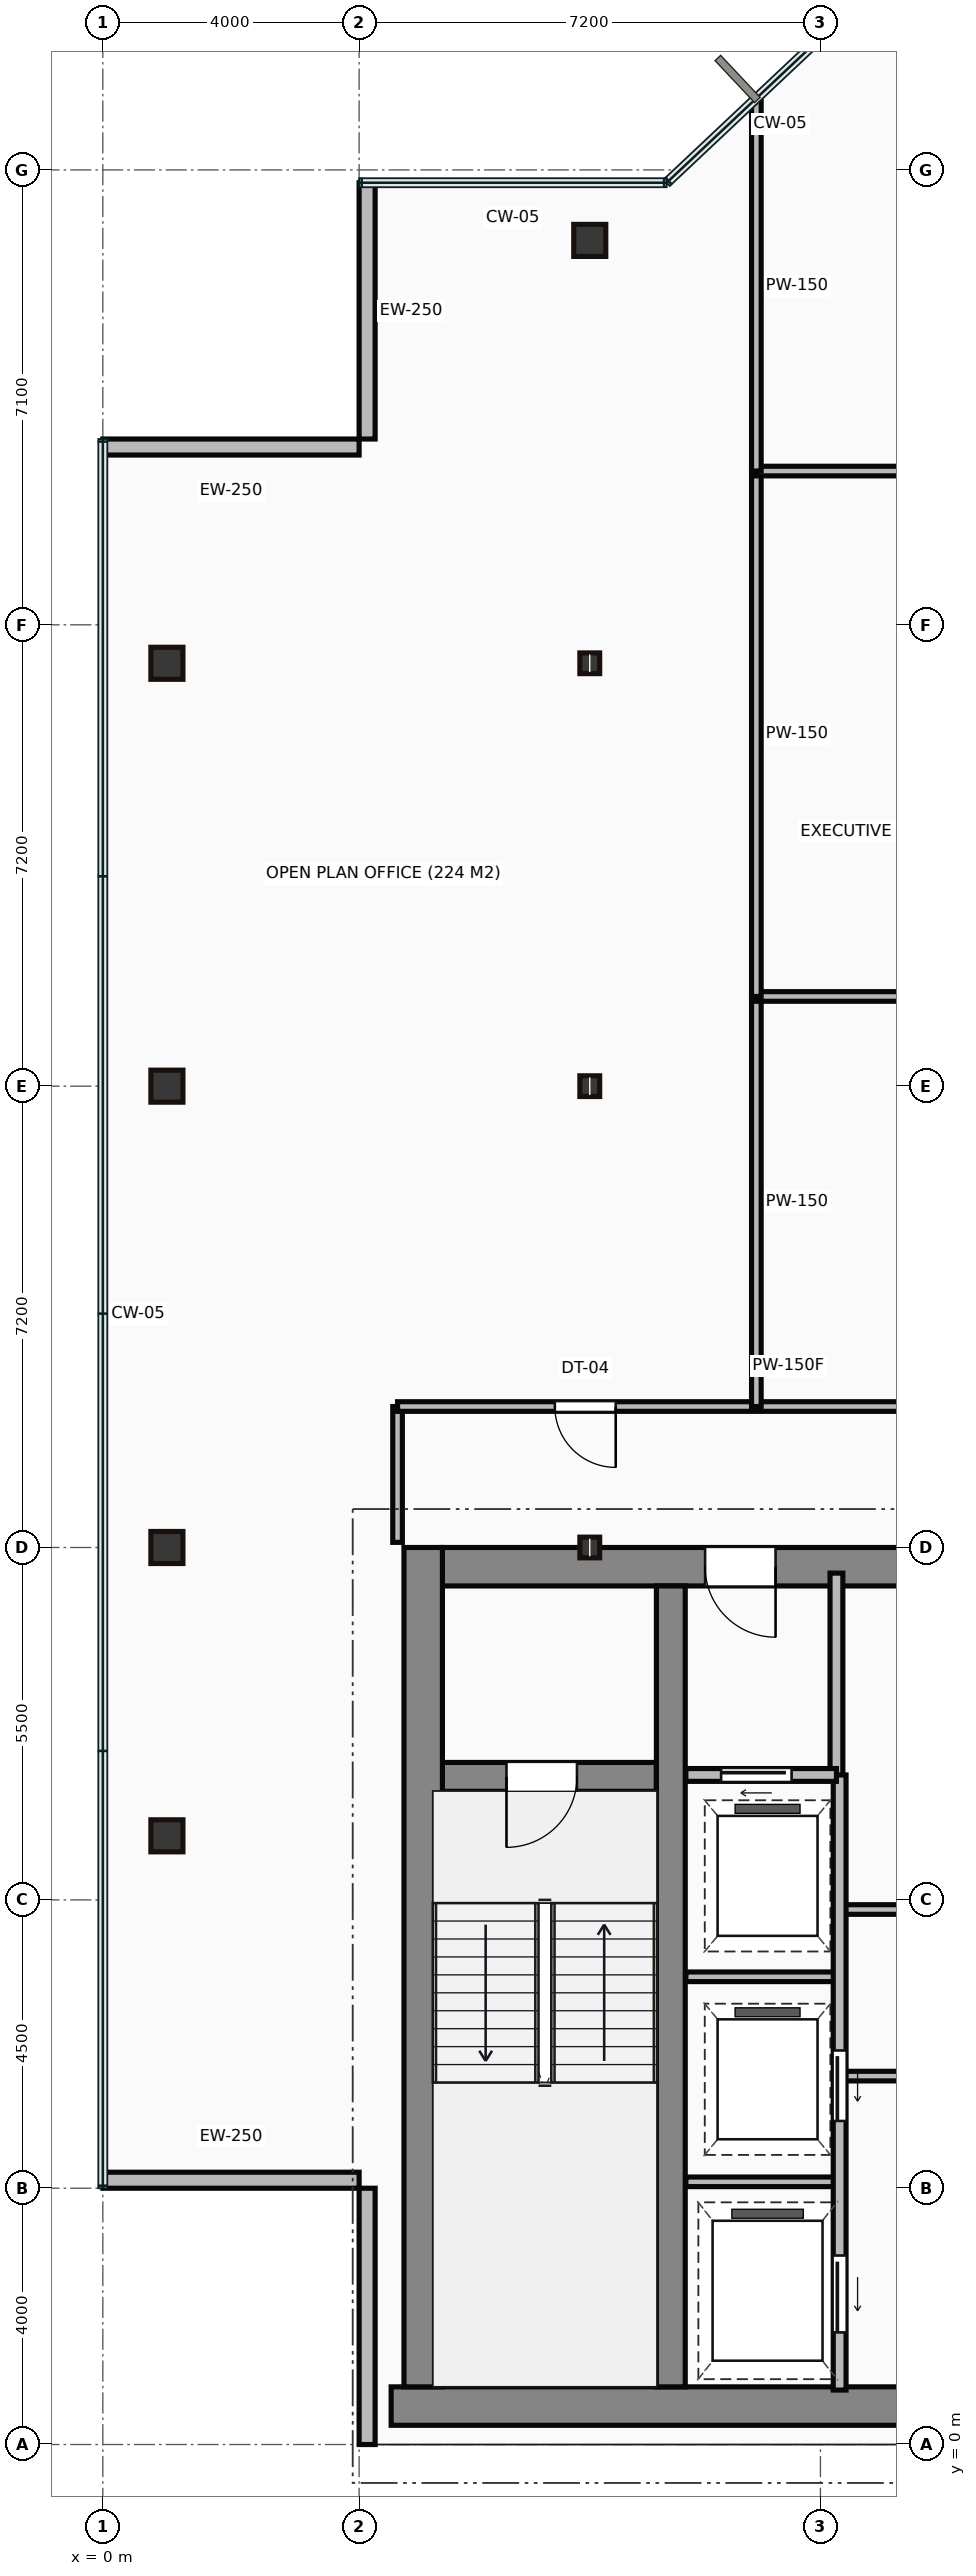
"""IFC4 building model, lengths in metres.
Left out: names, types, materials, properties, quantities, classifications, styles, units other than length and angle.
Written with IfcOpenShell. Run it as: python <this file> out.ifc"""

import sys

from ifc_helpers import new_model, si_unit, direction, frame, frame_2d, origin, origin_2d, place, context, subcontext, project, spatial, rectangle, hollow_rectangle, i_section, extrude, source, transform, mapped, element, fill, save


model = new_model("IFC4")
c1 = context("Model", 3, precision=1e-05, world=origin(), true_north=direction((0.0, 1.0)))
c2 = subcontext(c1, "Body", "Model", "MODEL_VIEW")
j1 = project(units=[si_unit("LENGTHUNIT", "METRE"), si_unit("PLANEANGLEUNIT", "RADIAN")], contexts=[c1])
p1 = place(None, origin())
s1 = spatial("IfcSite", under=j1, at=p1, CompositionType="ELEMENT")
p2 = place(p1, origin())
s2 = spatial("IfcBuilding", under=s1, at=p2, CompositionType="ELEMENT")
p3 = place(p2, frame((0.0, 0.0, 247.85)))
s3 = spatial("IfcBuildingStorey", under=s2, at=p3, CompositionType="ELEMENT", Elevation=247.85)
m1 = source(origin(), c2, "Body", "SweptSolid", [
    extrude(rectangle(XDim=29.5, YDim=0.6, at=frame_2d((14.75, 0.0))), origin(), (0.0, 0.0, 1.0), 3.65),
])
p4 = place(p3, frame((4.5, 0.6, 0.0), z_axis=(0.0, 0.0, 1.0), x_axis=(1.0, 0.0, 0.0)))
e1 = element("IfcWall", 1, at=p4, inside=s3, PredefinedType="SHEAR", context=c2, shape_type="MappedRepresentation", body=[
    mapped(m1, transform((0.0, 0.0, 0.0))),
])
m2 = source(origin(), c2, "Body", "SweptSolid", [
    extrude(rectangle(XDim=13.1, YDim=0.6, at=frame_2d((6.55, 0.0))), origin(), (0.0, 0.0, 1.0), 3.65),
])
p5 = place(p3, frame((5.0, 0.9, 0.0), z_axis=(0.0, 0.0, 1.0), x_axis=(0.0, 1.0, 0.0)))
e2 = element("IfcWall", 2, at=p5, inside=s3, PredefinedType="SHEAR", context=c2, shape_type="MappedRepresentation", body=[
    mapped(m2, transform((0.0, 0.0, 0.0))),
])
m3 = source(origin(), c2, "Body", "SweptSolid", [
    extrude(rectangle(XDim=9.1, YDim=0.6, at=frame_2d((4.55, 0.0))), origin(), (0.0, 0.0, 1.0), 3.65),
])
p6 = place(p3, frame((5.3, 13.7, 0.0), z_axis=(0.0, 0.0, 1.0), x_axis=(1.0, 0.0, 0.0)))
e3 = element("IfcWall", 3, at=p6, inside=s3, PredefinedType="SHEAR", context=c2, shape_type="MappedRepresentation", body=[
    mapped(m3, transform((0.0, 0.0, 0.0))),
])
p7 = place(p6, frame((4.1, 0.0, 0.0)))
e4 = element("IfcOpeningElement", 4, at=p7, cuts=e3, PredefinedType="OPENING", context=c2, shape_type="SweptSolid", body=[
    extrude(rectangle(XDim=1.1, YDim=2.15, at=frame_2d((0.55, 1.075))), frame((0.0, 0.31, 0.0), z_axis=(0.0, -1.0, 0.0), x_axis=(1.0, 0.0, 0.0)), (0.0, 0.0, 1.0), 0.62),
])
m4 = source(origin(), c2, "Body", "SweptSolid", [
    extrude(rectangle(XDim=12.5, YDim=0.45, at=frame_2d((6.25, 0.0))), origin(), (0.0, 0.0, 1.0), 3.65),
])
p8 = place(p3, frame((8.865, 0.9, 0.0), z_axis=(0.0, 0.0, 1.0), x_axis=(0.0, 1.0, 0.0)))
e5 = element("IfcWall", 5, at=p8, inside=s3, PredefinedType="SHEAR", context=c2, shape_type="MappedRepresentation", body=[
    mapped(m4, transform((0.0, 0.0, 0.0))),
])
m5 = source(origin(), c2, "Body", "SweptSolid", [
    extrude(rectangle(XDim=3.39, YDim=0.45, at=frame_2d((1.695, 0.0))), origin(), (0.0, 0.0, 1.0), 3.65),
])
p9 = place(p3, frame((5.25, 10.42, 0.0), z_axis=(0.0, 0.0, 1.0), x_axis=(1.0, 0.0, 0.0)))
e6 = element("IfcWall", 6, at=p9, inside=s3, PredefinedType="SHEAR", context=c2, shape_type="MappedRepresentation", body=[
    mapped(m5, transform((0.0, 0.0, 0.0))),
])
p10 = place(p9, frame((1.05, 0.0, 0.0)))
e7 = element("IfcOpeningElement", 7, at=p10, cuts=e6, PredefinedType="OPENING", context=c2, shape_type="SweptSolid", body=[
    extrude(rectangle(XDim=1.1, YDim=2.15, at=frame_2d((0.55, 1.075))), frame((0.0, 0.235, 0.0), z_axis=(0.0, -1.0, 0.0), x_axis=(1.0, 0.0, 0.0)), (0.0, 0.0, 1.0), 0.47),
])
m6 = source(origin(), c2, "Body", "SweptSolid", [
    extrude(hollow_rectangle(XDim=0.5, YDim=0.5, WallThickness=0.022, at=origin_2d()), origin(), (0.0, 0.0, 1.0), 3.65),
])
for number, where, z_axis, x_axis in (
    (8, (1.0, 9.5, 0.0), (0.0, 0.0, 1.0), (1.0, 0.0, 0.0)),
    (9, (1.0, 14.0, 0.0), (0.0, 0.0, 1.0), (1.0, 0.0, 0.0)),
    (10, (1.0, 21.2, 0.0), (0.0, 0.0, 1.0), (1.0, 0.0, 0.0)),
    (11, (1.0, 27.8, 0.0), (0.0, 0.0, 1.0), (1.0, 0.0, 0.0)),
):
    element("IfcColumn", number, at=place(p3, frame(where, z_axis=z_axis, x_axis=x_axis)), inside=s3, PredefinedType="COLUMN", context=c2, shape_type="MappedRepresentation", body=[
        mapped(m6, transform((0.0, 0.0, 0.0))),
    ])
m7 = source(origin(), c2, "Body", "SweptSolid", [
    extrude(i_section(OverallWidth=0.309, OverallDepth=0.323, WebThickness=0.014, FlangeThickness=0.023, at=origin_2d()), origin(), (0.0, 0.0, 1.0), 3.65),
])
for number, where, z_axis, x_axis in (
    (12, (7.6, 14.0, 0.0), (0.0, 0.0, 1.0), (1.0, 0.0, 0.0)),
    (13, (7.6, 21.2, 0.0), (0.0, 0.0, 1.0), (1.0, 0.0, 0.0)),
    (14, (7.6, 27.8, 0.0), (0.0, 0.0, 1.0), (1.0, 0.0, 0.0)),
):
    element("IfcColumn", number, at=place(p3, frame(where, z_axis=z_axis, x_axis=x_axis)), inside=s3, PredefinedType="COLUMN", context=c2, shape_type="MappedRepresentation", body=[
        mapped(m7, transform((0.0, 0.0, 0.0))),
    ])
p11 = place(p3, frame((7.6, 34.4, 0.0), z_axis=(0.0, 0.0, 1.0), x_axis=(1.0, 0.0, 0.0)))
e15 = element("IfcColumn", 15, at=p11, inside=s3, PredefinedType="COLUMN", context=c2, shape_type="MappedRepresentation", body=[
    mapped(m6, transform((0.0, 0.0, 0.0))),
])
m8 = source(origin(), c2, "Body", "SweptSolid", [
    extrude(rectangle(XDim=4.0, YDim=0.25, at=frame_2d((2.0, 0.0))), origin(), (0.0, 0.0, 1.0), 3.4),
])
for number, where, z_axis, x_axis in (
    (16, (4.125, 35.3, 0.0), (0.0, 0.0, 1.0), (0.0, -1.0, 0.0)),
    (17, (4.0, 31.175, 0.0), (0.0, 0.0, 1.0), (-1.0, 0.0, 0.0)),
    (18, (0.0, 4.125, 0.0), (0.0, 0.0, 1.0), (1.0, 0.0, 0.0)),
    (19, (4.125, 4.0, 0.0), (0.0, 0.0, 1.0), (0.0, -1.0, 0.0)),
):
    element("IfcWall", number, at=place(p3, frame(where, z_axis=z_axis, x_axis=x_axis)), inside=s3, PredefinedType="STANDARD", context=c2, shape_type="MappedRepresentation", body=[
        mapped(m8, transform((0.0, 0.0, 0.0))),
    ])
m9 = source(origin(), c2, "Body", "SweptSolid", [
    extrude(rectangle(XDim=3.18, YDim=0.2, at=frame_2d((1.59, 0.0))), origin(), (0.0, 0.0, 1.0), 3.4),
])
p12 = place(p3, frame((11.45, 10.42, 0.0), z_axis=(0.0, 0.0, 1.0), x_axis=(0.0, 1.0, 0.0)))
e20 = element("IfcWall", 20, at=p12, inside=s3, PredefinedType="PARTITIONING", context=c2, shape_type="MappedRepresentation", body=[
    mapped(m9, transform((0.0, 0.0, 0.0))),
])
m10 = source(origin(), c2, "Body", "SweptSolid", [
    extrude(rectangle(XDim=2.35, YDim=0.2, at=frame_2d((1.175, 0.0))), origin(), (0.0, 0.0, 1.0), 3.4),
])
p13 = place(p3, frame((9.1, 10.45, 0.0), z_axis=(0.0, 0.0, 1.0), x_axis=(1.0, 0.0, 0.0)))
e21 = element("IfcWall", 21, at=p13, inside=s3, PredefinedType="PARTITIONING", context=c2, shape_type="MappedRepresentation", body=[
    mapped(m10, transform((0.0, 0.0, 0.0))),
])
p14 = place(p13, frame((0.55, 0.0, 0.0)))
e22 = element("IfcOpeningElement", 22, at=p14, cuts=e21, PredefinedType="OPENING", context=c2, shape_type="SweptSolid", body=[
    extrude(rectangle(XDim=1.1, YDim=2.15, at=frame_2d((0.55, 1.075))), frame((0.0, 0.11, 0.0), z_axis=(0.0, -1.0, 0.0), x_axis=(1.0, 0.0, 0.0)), (0.0, 0.0, 1.0), 0.22),
])
m11 = source(origin(), c2, "Body", "SweptSolid", [
    extrude(rectangle(XDim=9.6, YDim=0.2, at=frame_2d((4.8, 0.0))), origin(), (0.0, 0.0, 1.0), 3.4),
])
p15 = place(p3, frame((11.5, 0.85, 0.0), z_axis=(0.0, 0.0, 1.0), x_axis=(0.0, 1.0, 0.0)))
e23 = element("IfcWall", 23, at=p15, inside=s3, PredefinedType="PARTITIONING", context=c2, shape_type="MappedRepresentation", body=[
    mapped(m11, transform((0.0, 0.0, 0.0))),
])
p16 = place(p15, frame((4.2, 0.0, 0.0)))
e24 = element("IfcOpeningElement", 24, at=p16, cuts=e23, PredefinedType="OPENING", context=c2, shape_type="SweptSolid", body=[
    extrude(rectangle(XDim=1.1, YDim=2.15, at=frame_2d((0.55, 1.075))), frame((0.0, 0.11, 0.0), z_axis=(0.0, -1.0, 0.0), x_axis=(1.0, 0.0, 0.0)), (0.0, 0.0, 1.0), 0.22),
])
p17 = place(p15, frame((0.9, 0.0, 0.0)))
e25 = element("IfcOpeningElement", 25, at=p17, cuts=e23, PredefinedType="OPENING", context=c2, shape_type="SweptSolid", body=[
    extrude(rectangle(XDim=1.2, YDim=2.15, at=frame_2d((0.6, 1.075))), frame((0.0, 0.11, 0.0), z_axis=(0.0, -1.0, 0.0), x_axis=(1.0, 0.0, 0.0)), (0.0, 0.0, 1.0), 0.22),
])
m12 = source(origin(), c2, "Body", "SweptSolid", [
    extrude(rectangle(XDim=2.4, YDim=0.15, at=frame_2d((1.2, 0.0))), origin(), (0.0, 0.0, 1.0), 3.4),
])
for number, where, z_axis, x_axis in (
    (26, (9.1, 4.1, 0.0), (0.0, 0.0, 1.0), (1.0, 0.0, 0.0)),
    (27, (9.1, 7.3, 0.0), (0.0, 0.0, 1.0), (1.0, 0.0, 0.0)),
):
    element("IfcWall", number, at=place(p3, frame(where, z_axis=z_axis, x_axis=x_axis)), inside=s3, PredefinedType="PARTITIONING", context=c2, shape_type="MappedRepresentation", body=[
        mapped(m12, transform((0.0, 0.0, 0.0))),
    ])
m13 = source(origin(), c2, "Body", "SweptSolid", [
    extrude(rectangle(XDim=11.85, YDim=0.15, at=frame_2d((5.925, 0.0))), origin(), (0.0, 0.0, 1.0), 3.4),
])
p18 = place(p3, frame((11.55, 5.75, 0.0), z_axis=(0.0, 0.0, 1.0), x_axis=(1.0, 0.0, 0.0)))
e28 = element("IfcWall", 28, at=p18, inside=s3, PredefinedType="PARTITIONING", context=c2, shape_type="MappedRepresentation", body=[
    mapped(m13, transform((0.0, 0.0, 0.0))),
])
p19 = place(p3, frame((11.55, 8.35, 0.0), z_axis=(0.0, 0.0, 1.0), x_axis=(1.0, 0.0, 0.0)))
e29 = element("IfcWall", 29, at=p19, inside=s3, PredefinedType="PARTITIONING", context=c2, shape_type="MappedRepresentation", body=[
    mapped(m13, transform((0.0, 0.0, 0.0))),
])
p20 = place(p19, frame((1.1, 0.0, 0.0)))
e30 = element("IfcOpeningElement", 30, at=p20, cuts=e29, PredefinedType="OPENING", context=c2, shape_type="SweptSolid", body=[
    extrude(rectangle(XDim=0.95, YDim=2.15, at=frame_2d((0.475, 1.075))), frame((0.0, 0.085, 0.0), z_axis=(0.0, -1.0, 0.0), x_axis=(1.0, 0.0, 0.0)), (0.0, 0.0, 1.0), 0.17),
])
p21 = place(p19, frame((9.4, 0.0, 0.0)))
e31 = element("IfcOpeningElement", 31, at=p21, cuts=e29, PredefinedType="OPENING", context=c2, shape_type="SweptSolid", body=[
    extrude(rectangle(XDim=0.95, YDim=2.15, at=frame_2d((0.475, 1.075))), frame((0.0, 0.085, 0.0), z_axis=(0.0, -1.0, 0.0), x_axis=(1.0, 0.0, 0.0)), (0.0, 0.0, 1.0), 0.17),
])
m14 = source(origin(), c2, "Body", "SweptSolid", [
    extrude(rectangle(XDim=2.12, YDim=0.15, at=frame_2d((1.06, 0.0))), origin(), (0.0, 0.0, 1.0), 3.4),
])
p22 = place(p3, frame((4.6, 14.08, 0.0), z_axis=(0.0, 0.0, 1.0), x_axis=(0.0, 1.0, 0.0)))
e32 = element("IfcWall", 32, at=p22, inside=s3, PredefinedType="PARTITIONING", context=c2, shape_type="MappedRepresentation", body=[
    mapped(m14, transform((0.0, 0.0, 0.0))),
])
m15 = source(origin(), c2, "Body", "SweptSolid", [
    extrude(rectangle(XDim=12.2, YDim=0.15, at=frame_2d((6.1, 0.0))), origin(), (0.0, 0.0, 1.0), 3.4),
])
p23 = place(p3, frame((4.6, 16.2, 0.0), z_axis=(0.0, 0.0, 1.0), x_axis=(1.0, 0.0, 0.0)))
e33 = element("IfcWall", 33, at=p23, inside=s3, PredefinedType="PARTITIONING", context=c2, shape_type="MappedRepresentation", body=[
    mapped(m15, transform((0.0, 0.0, 0.0))),
])
p24 = place(p23, frame((2.455, 0.0, 0.0)))
e34 = element("IfcOpeningElement", 34, at=p24, cuts=e33, PredefinedType="OPENING", context=c2, shape_type="SweptSolid", body=[
    extrude(rectangle(XDim=0.95, YDim=2.15, at=frame_2d((0.475, 1.075))), frame((0.0, 0.085, 0.0), z_axis=(0.0, -1.0, 0.0), x_axis=(1.0, 0.0, 0.0)), (0.0, 0.0, 1.0), 0.17),
])
p25 = place(p23, frame((8.295, 0.0, 0.0)))
e35 = element("IfcOpeningElement", 35, at=p25, cuts=e33, PredefinedType="OPENING", context=c2, shape_type="SweptSolid", body=[
    extrude(rectangle(XDim=0.95, YDim=2.15, at=frame_2d((0.475, 1.075))), frame((0.0, 0.085, 0.0), z_axis=(0.0, -1.0, 0.0), x_axis=(1.0, 0.0, 0.0)), (0.0, 0.0, 1.0), 0.17),
])
m16 = source(origin(), c2, "Body", "SweptSolid", [
    extrude(rectangle(XDim=6.4, YDim=0.15, at=frame_2d((3.2, 0.0))), origin(), (0.0, 0.0, 1.0), 3.4),
])
p26 = place(p3, frame((10.2, 22.6, 0.0), z_axis=(0.0, 0.0, 1.0), x_axis=(0.0, -1.0, 0.0)))
e36 = element("IfcWall", 36, at=p26, inside=s3, PredefinedType="PARTITIONING", context=c2, shape_type="MappedRepresentation", body=[
    mapped(m16, transform((0.0, 0.0, 0.0))),
])
m17 = source(origin(), c2, "Body", "SweptSolid", [
    extrude(rectangle(XDim=6.6, YDim=0.15, at=frame_2d((3.3, 0.0))), origin(), (0.0, 0.0, 1.0), 3.4),
])
p27 = place(p3, frame((10.2, 22.6, 0.0), z_axis=(0.0, 0.0, 1.0), x_axis=(1.0, 0.0, 0.0)))
e37 = element("IfcWall", 37, at=p27, inside=s3, PredefinedType="PARTITIONING", context=c2, shape_type="MappedRepresentation", body=[
    mapped(m17, transform((0.0, 0.0, 0.0))),
])
m18 = source(origin(), c2, "Body", "SweptSolid", [
    extrude(rectangle(XDim=8.2, YDim=0.15, at=frame_2d((4.1, 0.0))), origin(), (0.0, 0.0, 1.0), 3.4),
])
p28 = place(p3, frame((10.2, 30.8, 0.0), z_axis=(0.0, 0.0, 1.0), x_axis=(0.0, -1.0, 0.0)))
e38 = element("IfcWall", 38, at=p28, inside=s3, PredefinedType="PARTITIONING", context=c2, shape_type="MappedRepresentation", body=[
    mapped(m18, transform((0.0, 0.0, 0.0))),
])
p29 = place(p3, frame((10.2, 30.8, 0.0), z_axis=(0.0, 0.0, 1.0), x_axis=(1.0, 0.0, 0.0)))
e39 = element("IfcWall", 39, at=p29, inside=s3, PredefinedType="PARTITIONING", context=c2, shape_type="MappedRepresentation", body=[
    mapped(m17, transform((0.0, 0.0, 0.0))),
])
m19 = source(origin(), c2, "Body", "SweptSolid", [
    extrude(rectangle(XDim=5.79, YDim=0.15, at=frame_2d((2.895, 0.0))), origin(), (0.0, 0.0, 1.0), 3.4),
])
p30 = place(p3, frame((10.2, 36.59, 0.0), z_axis=(0.0, 0.0, 1.0), x_axis=(0.0, -1.0, 0.0)))
e40 = element("IfcWall", 40, at=p30, inside=s3, PredefinedType="PARTITIONING", context=c2, shape_type="MappedRepresentation", body=[
    mapped(m19, transform((0.0, 0.0, 0.0))),
])
m20 = source(origin(), c2, "Body", "SweptSolid", [
    extrude(rectangle(XDim=1.1, YDim=2.15, at=frame_2d((0.55, 1.075))), frame((0.0, 0.025, 0.0), z_axis=(0.0, -1.0, 0.0), x_axis=(1.0, 0.0, 0.0)), (0.0, 0.0, 1.0), 0.05),
])
p31 = place(p10, frame((1.1, 0.0, 0.0), z_axis=(0.0, 0.0, 1.0), x_axis=(-1.0, 0.0, 0.0)))
e41 = element("IfcDoor", 41, at=p31, inside=s3, OperationType="SINGLE_SWING_LEFT", PredefinedType="DOOR", context=c2, shape_type="MappedRepresentation", body=[
    mapped(m20, transform((0.0, 0.0, 0.0))),
])
fill(e7, e41)
p32 = place(p7, origin())
e42 = element("IfcDoor", 42, at=p32, inside=s3, OperationType="SINGLE_SWING_RIGHT", PredefinedType="DOOR", context=c2, shape_type="MappedRepresentation", body=[
    mapped(m20, transform((0.0, 0.0, 0.0))),
])
fill(e4, e42)
p33 = place(p14, origin())
e43 = element("IfcDoor", 43, at=p33, inside=s3, OperationType="SLIDING_TO_LEFT", PredefinedType="DOOR", context=c2, shape_type="MappedRepresentation", body=[
    mapped(m20, transform((0.0, 0.0, 0.0))),
])
fill(e22, e43)
p34 = place(p16, frame((1.1, 0.0, 0.0), z_axis=(0.0, 0.0, 1.0), x_axis=(-1.0, 0.0, 0.0)))
e44 = element("IfcDoor", 44, at=p34, inside=s3, OperationType="SLIDING_TO_LEFT", PredefinedType="DOOR", context=c2, shape_type="MappedRepresentation", body=[
    mapped(m20, transform((0.0, 0.0, 0.0))),
])
fill(e24, e44)
m21 = source(origin(), c2, "Body", "SweptSolid", [
    extrude(rectangle(XDim=1.2, YDim=2.15, at=frame_2d((0.6, 1.075))), frame((0.0, 0.025, 0.0), z_axis=(0.0, -1.0, 0.0), x_axis=(1.0, 0.0, 0.0)), (0.0, 0.0, 1.0), 0.05),
])
p35 = place(p17, frame((1.2, 0.0, 0.0), z_axis=(0.0, 0.0, 1.0), x_axis=(-1.0, 0.0, 0.0)))
e45 = element("IfcDoor", 45, at=p35, inside=s3, OperationType="SLIDING_TO_LEFT", PredefinedType="DOOR", context=c2, shape_type="MappedRepresentation", body=[
    mapped(m21, transform((0.0, 0.0, 0.0))),
])
fill(e25, e45)
m22 = source(origin(), c2, "Body", "SweptSolid", [
    extrude(rectangle(XDim=0.95, YDim=2.15, at=frame_2d((0.475, 1.075))), frame((0.0, 0.025, 0.0), z_axis=(0.0, -1.0, 0.0), x_axis=(1.0, 0.0, 0.0)), (0.0, 0.0, 1.0), 0.05),
])
p36 = place(p24, origin())
e46 = element("IfcDoor", 46, at=p36, inside=s3, OperationType="SINGLE_SWING_RIGHT", PredefinedType="DOOR", context=c2, shape_type="MappedRepresentation", body=[
    mapped(m22, transform((0.0, 0.0, 0.0))),
])
fill(e34, e46)
save(model, sys.argv[1])
